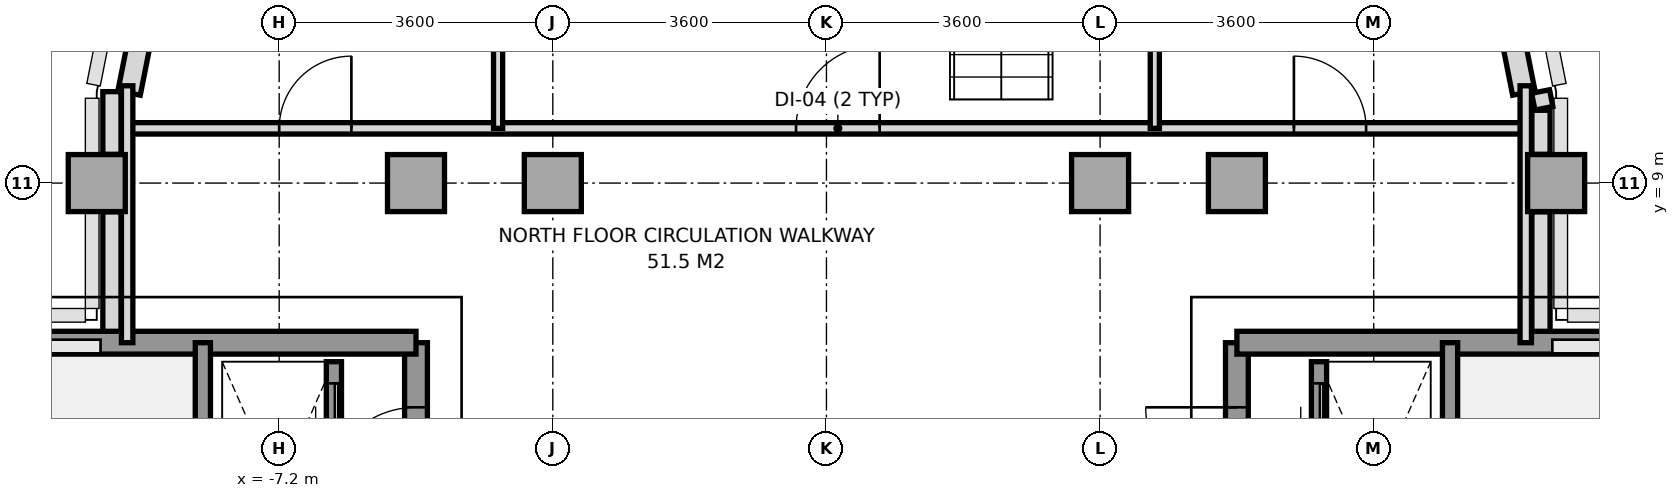
"""IFC4 building model, lengths in metres.
Left out: names, types, materials, properties, quantities, classifications, styles, units other than length and angle.
Written with IfcOpenShell. Run it as: python <this file> out.ifc"""

import sys

from ifc_helpers import new_model, si_unit, direction, frame, frame_2d, origin, origin_2d, place, context, subcontext, project, spatial, rectangle, extrude, source, transform, mapped, element, fill, save


model = new_model("IFC4")
c1 = context("Model", 3, precision=1e-05, world=origin(), true_north=direction((0.0, 1.0)))
c2 = subcontext(c1, "Body", "Model", "MODEL_VIEW")
j1 = project(units=[si_unit("LENGTHUNIT", "METRE"), si_unit("PLANEANGLEUNIT", "RADIAN")], contexts=[c1])
p1 = place(None, origin())
s1 = spatial("IfcSite", under=j1, at=p1, CompositionType="ELEMENT")
p2 = place(p1, origin())
s2 = spatial("IfcBuilding", under=s1, at=p2, CompositionType="ELEMENT")
p3 = place(p2, frame((0.0, 0.0, 230.0)))
s3 = spatial("IfcBuildingStorey", under=s2, at=p3, CompositionType="ELEMENT", Elevation=230.0)
m1 = source(origin(), c2, "Body", "SweptSolid", [
    extrude(rectangle(XDim=0.75, YDim=0.75, at=origin_2d()), origin(), (0.0, 0.0, 1.0), 3.01),
])
for number, where, z_axis, x_axis in (
    (1, (-9.6, 9.0, 0.0), (0.0, 0.0, 1.0), (1.0, 0.0, 0.0)),
    (2, (-5.4, 9.0, 0.0), (0.0, 0.0, 1.0), (1.0, 0.0, 0.0)),
    (3, (-3.6, 9.0, 0.0), (0.0, 0.0, 1.0), (1.0, 0.0, 0.0)),
    (4, (3.6, 9.0, 0.0), (0.0, 0.0, 1.0), (1.0, 0.0, 0.0)),
    (5, (5.4, 9.0, 0.0), (0.0, 0.0, 1.0), (1.0, 0.0, 0.0)),
    (6, (9.6, 9.0, 0.0), (0.0, 0.0, 1.0), (1.0, 0.0, 0.0)),
):
    element("IfcColumn", number, at=place(p3, frame(where, z_axis=z_axis, x_axis=x_axis)), inside=s3, PredefinedType="COLUMN", context=c2, shape_type="MappedRepresentation", body=[
        mapped(m1, transform((0.0, 0.0, 0.0), x_axis=(1.0, 0.0, 0.0), y_axis=(0.0, 1.0, 0.0), z_axis=(0.0, 0.0, 1.0), scale=1.0)),
    ])
for number, where, z_axis, x_axis in (
    (7, (9.175, 10.185, 0.0), (0.0, 0.0, 1.0), (-0.195, 0.981, 0.0)),
    (8, (-8.471, 13.725, 0.0), (0.0, 0.0, 1.0), (-0.195, -0.981, 0.0)),
):
    element("IfcWall", number, at=place(p3, frame(where, z_axis=z_axis, x_axis=x_axis)), inside=s3, PredefinedType="SOLIDWALL", context=c2, shape_type="SweptSolid", body=[
        extrude(rectangle(XDim=3.609, YDim=0.3, at=frame_2d((1.804, 0.0))), origin(), (0.0, 0.0, 1.0), 3.01),
    ])
p4 = place(p3, frame((-9.4, 6.953, 0.0), z_axis=(0.0, 0.0, 1.0), x_axis=(0.0, 1.0, 0.0)))
e9 = element("IfcWall", 9, at=p4, inside=s3, PredefinedType="PARAPET", context=c2, shape_type="SweptSolid", body=[
    extrude(rectangle(XDim=1.669, YDim=0.24, at=frame_2d((0.834, 0.0))), origin(), (0.0, 0.0, 1.0), 1.15),
])
p5 = place(p3, frame((-9.4, 9.378, 0.0), z_axis=(0.0, 0.0, 1.0), x_axis=(0.0, 1.0, 0.0)))
e10 = element("IfcWall", 10, at=p5, inside=s3, PredefinedType="PARAPET", context=c2, shape_type="SweptSolid", body=[
    extrude(rectangle(XDim=0.825, YDim=0.24, at=frame_2d((0.413, 0.0))), origin(), (0.0, 0.0, 1.0), 1.15),
])
p6 = place(p3, frame((9.395, 10.204, 0.0), z_axis=(0.0, 0.0, 1.0), x_axis=(0.194859894132, -0.980831087221, 0.0)))
e11 = element("IfcWall", 11, at=p6, inside=s3, PredefinedType="PARAPET", context=c2, shape_type="SweptSolid", body=[
    extrude(rectangle(XDim=0.224, YDim=0.24, at=frame_2d((0.112, 0.0))), origin(), (0.0, 0.0, 1.0), 1.15),
])
p7 = place(p3, frame((9.4, 9.958, 0.0), z_axis=(0.0, 0.0, 1.0), x_axis=(0.0, -1.0, 0.0)))
e12 = element("IfcWall", 12, at=p7, inside=s3, PredefinedType="PARAPET", context=c2, shape_type="SweptSolid", body=[
    extrude(rectangle(XDim=0.58, YDim=0.24, at=frame_2d((0.29, 0.0))), origin(), (0.0, 0.0, 1.0), 1.15),
])
p8 = place(p3, frame((9.4, 8.622, 0.0), z_axis=(0.0, 0.0, 1.0), x_axis=(0.0, -1.0, 0.0)))
e13 = element("IfcWall", 13, at=p8, inside=s3, PredefinedType="PARAPET", context=c2, shape_type="SweptSolid", body=[
    extrude(rectangle(XDim=1.669, YDim=0.24, at=frame_2d((0.834, 0.0))), origin(), (0.0, 0.0, 1.0), 1.15),
])
p9 = place(p3, frame((-5.4, -5.6, 0.0), z_axis=(0.0, 0.0, 1.0), x_axis=(0.0, 1.0, 0.0)))
e14 = element("IfcWall", 14, at=p9, inside=s3, PredefinedType="SHEAR", context=c2, shape_type="SweptSolid", body=[
    extrude(rectangle(XDim=12.5, YDim=0.3, at=frame_2d((6.25, 0.0))), origin(), (0.0, 0.0, 1.0), 3.01),
])
p10 = place(p9, frame((4.55, 0.0, 0.0)))
e15 = element("IfcOpeningElement", 15, at=p10, cuts=e14, PredefinedType="OPENING", context=c2, shape_type="SweptSolid", body=[
    extrude(rectangle(XDim=1.2, YDim=2.2, at=frame_2d((0.6, 1.1))), frame((0.0, 0.16, 0.0), z_axis=(0.0, -1.0, 0.0), x_axis=(1.0, 0.0, 0.0)), (0.0, 0.0, 1.0), 0.32),
])
p11 = place(p9, frame((10.45, 0.0, 0.0)))
e16 = element("IfcOpeningElement", 16, at=p11, cuts=e14, PredefinedType="OPENING", context=c2, shape_type="SweptSolid", body=[
    extrude(rectangle(XDim=1.2, YDim=2.2, at=frame_2d((0.6, 1.1))), frame((0.0, 0.16, 0.0), z_axis=(0.0, -1.0, 0.0), x_axis=(1.0, 0.0, 0.0)), (0.0, 0.0, 1.0), 0.32),
])
p12 = place(p9, frame((6.86, 0.0, 0.0)))
e17 = element("IfcOpeningElement", 17, at=p12, cuts=e14, PredefinedType="OPENING", context=c2, shape_type="SweptSolid", body=[
    extrude(rectangle(XDim=0.8, YDim=2.1, at=frame_2d((0.4, 1.05))), frame((0.0, 0.16, 0.0), z_axis=(0.0, -1.0, 0.0), x_axis=(1.0, 0.0, 0.0)), (0.0, 0.0, 1.0), 0.32),
])
p13 = place(p3, frame((-11.356, 6.9, 0.0), z_axis=(0.0, 0.0, 1.0), x_axis=(1.0, 0.0, 0.0)))
e18 = element("IfcWall", 18, at=p13, inside=s3, PredefinedType="SHEAR", context=c2, shape_type="SweptSolid", body=[
    extrude(rectangle(XDim=5.956, YDim=0.3, at=frame_2d((2.978, 0.0))), origin(), (0.0, 0.0, 1.0), 3.01),
])
p14 = place(p3, frame((-8.204, -0.016, 0.0), z_axis=(0.0, 0.0, 1.0), x_axis=(0.0, 1.0, 0.0)))
e19 = element("IfcWall", 19, at=p14, inside=s3, PredefinedType="SOLIDWALL", context=c2, shape_type="SweptSolid", body=[
    extrude(rectangle(XDim=6.916, YDim=0.2, at=frame_2d((3.458, 0.0))), origin(), (0.0, 0.0, 1.0), 3.01),
])
p15 = place(p14, frame((0.2, 0.0, 0.0)))
e20 = element("IfcOpeningElement", 20, at=p15, cuts=e19, PredefinedType="OPENING", context=c2, shape_type="SweptSolid", body=[
    extrude(rectangle(XDim=1.2, YDim=2.2, at=frame_2d((0.6, 1.1))), frame((0.0, 0.11, 0.0), z_axis=(0.0, -1.0, 0.0), x_axis=(1.0, 0.0, 0.0)), (0.0, 0.0, 1.0), 0.22),
])
p16 = place(p3, frame((5.4, -5.6, 0.0), z_axis=(0.0, 0.0, 1.0), x_axis=(0.0, 1.0, 0.0)))
e21 = element("IfcWall", 21, at=p16, inside=s3, PredefinedType="SHEAR", context=c2, shape_type="SweptSolid", body=[
    extrude(rectangle(XDim=12.5, YDim=0.3, at=frame_2d((6.25, 0.0))), origin(), (0.0, 0.0, 1.0), 3.01),
])
p17 = place(p16, frame((4.55, 0.0, 0.0)))
e22 = element("IfcOpeningElement", 22, at=p17, cuts=e21, PredefinedType="OPENING", context=c2, shape_type="SweptSolid", body=[
    extrude(rectangle(XDim=1.2, YDim=2.2, at=frame_2d((0.6, 1.1))), frame((0.0, 0.16, 0.0), z_axis=(0.0, -1.0, 0.0), x_axis=(1.0, 0.0, 0.0)), (0.0, 0.0, 1.0), 0.32),
])
p18 = place(p16, frame((10.45, 0.0, 0.0)))
e23 = element("IfcOpeningElement", 23, at=p18, cuts=e21, PredefinedType="OPENING", context=c2, shape_type="SweptSolid", body=[
    extrude(rectangle(XDim=1.2, YDim=2.2, at=frame_2d((0.6, 1.1))), frame((0.0, 0.16, 0.0), z_axis=(0.0, -1.0, 0.0), x_axis=(1.0, 0.0, 0.0)), (0.0, 0.0, 1.0), 0.32),
])
p19 = place(p16, frame((6.86, 0.0, 0.0)))
e24 = element("IfcOpeningElement", 24, at=p19, cuts=e21, PredefinedType="OPENING", context=c2, shape_type="SweptSolid", body=[
    extrude(rectangle(XDim=0.8, YDim=2.1, at=frame_2d((0.4, 1.05))), frame((0.0, 0.16, 0.0), z_axis=(0.0, -1.0, 0.0), x_axis=(1.0, 0.0, 0.0)), (0.0, 0.0, 1.0), 0.32),
])
p20 = place(p16, frame((7.88, 0.0, 0.0)))
e25 = element("IfcOpeningElement", 25, at=p20, cuts=e21, PredefinedType="OPENING", context=c2, shape_type="SweptSolid", body=[
    extrude(rectangle(XDim=0.8, YDim=2.1, at=frame_2d((0.4, 1.05))), frame((0.0, 0.16, 0.0), z_axis=(0.0, -1.0, 0.0), x_axis=(1.0, 0.0, 0.0)), (0.0, 0.0, 1.0), 0.32),
])
p21 = place(p3, frame((5.4, 6.9, 0.0), z_axis=(0.0, 0.0, 1.0), x_axis=(1.0, 0.0, 0.0)))
e26 = element("IfcWall", 26, at=p21, inside=s3, PredefinedType="SHEAR", context=c2, shape_type="SweptSolid", body=[
    extrude(rectangle(XDim=5.956, YDim=0.3, at=frame_2d((2.978, 0.0))), origin(), (0.0, 0.0, 1.0), 3.01),
])
p22 = place(p3, frame((8.204, -0.016, 0.0), z_axis=(0.0, 0.0, 1.0), x_axis=(0.0, 1.0, 0.0)))
e27 = element("IfcWall", 27, at=p22, inside=s3, PredefinedType="SOLIDWALL", context=c2, shape_type="SweptSolid", body=[
    extrude(rectangle(XDim=6.916, YDim=0.2, at=frame_2d((3.458, 0.0))), origin(), (0.0, 0.0, 1.0), 3.01),
])
p23 = place(p22, frame((0.2, 0.0, 0.0)))
e28 = element("IfcOpeningElement", 28, at=p23, cuts=e27, PredefinedType="OPENING", context=c2, shape_type="SweptSolid", body=[
    extrude(rectangle(XDim=1.2, YDim=2.2, at=frame_2d((0.6, 1.1))), frame((0.0, 0.11, 0.0), z_axis=(0.0, -1.0, 0.0), x_axis=(1.0, 0.0, 0.0)), (0.0, 0.0, 1.0), 0.22),
])
p24 = place(p3, frame((-6.48, 4.98, 0.0), z_axis=(0.0, 0.0, 1.0), x_axis=(0.0, 1.0, 0.0)))
e29 = element("IfcWall", 29, at=p24, inside=s3, PredefinedType="SOLIDWALL", context=c2, shape_type="SweptSolid", body=[
    extrude(rectangle(XDim=1.67, YDim=0.2, at=frame_2d((0.835, 0.0))), origin(), (0.0, 0.0, 1.0), 3.01),
])
p25 = place(p24, frame((0.285, 0.0, 0.0)))
e30 = element("IfcOpeningElement", 30, at=p25, cuts=e29, PredefinedType="OPENING", context=c2, shape_type="SweptSolid", body=[
    extrude(rectangle(XDim=1.1, YDim=2.2, at=frame_2d((0.55, 1.1))), frame((0.0, 0.11, 0.0), z_axis=(0.0, -1.0, 0.0), x_axis=(1.0, 0.0, 0.0)), (0.0, 0.0, 1.0), 0.22),
])
p26 = place(p3, frame((6.48, 4.98, 0.0), z_axis=(0.0, 0.0, 1.0), x_axis=(0.0, 1.0, 0.0)))
e31 = element("IfcWall", 31, at=p26, inside=s3, PredefinedType="SOLIDWALL", context=c2, shape_type="SweptSolid", body=[
    extrude(rectangle(XDim=1.67, YDim=0.2, at=frame_2d((0.835, 0.0))), origin(), (0.0, 0.0, 1.0), 3.01),
])
p27 = place(p26, frame((0.285, 0.0, 0.0)))
e32 = element("IfcOpeningElement", 32, at=p27, cuts=e31, PredefinedType="OPENING", context=c2, shape_type="SweptSolid", body=[
    extrude(rectangle(XDim=1.1, YDim=2.2, at=frame_2d((0.55, 1.1))), frame((0.0, 0.11, 0.0), z_axis=(0.0, -1.0, 0.0), x_axis=(1.0, 0.0, 0.0)), (0.0, 0.0, 1.0), 0.22),
])
p28 = place(p3, frame((-9.2, 9.72, 0.0), z_axis=(0.0, 0.0, 1.0), x_axis=(1.0, 0.0, 0.0)))
e33 = element("IfcWall", 33, at=p28, inside=s3, PredefinedType="PARTITIONING", context=c2, shape_type="SweptSolid", body=[
    extrude(rectangle(XDim=18.4, YDim=0.15, at=frame_2d((9.2, 0.0))), origin(), (0.0, 0.0, 1.0), 3.01),
])
p29 = place(p28, frame((2.0, 0.0, 0.0)))
e34 = element("IfcOpeningElement", 34, at=p29, cuts=e33, PredefinedType="OPENING", context=c2, shape_type="SweptSolid", body=[
    extrude(rectangle(XDim=0.95, YDim=2.15, at=frame_2d((0.475, 1.075))), frame((0.0, 0.085, 0.0), z_axis=(0.0, -1.0, 0.0), x_axis=(1.0, 0.0, 0.0)), (0.0, 0.0, 1.0), 0.17),
])
p30 = place(p28, frame((15.35, 0.0, 0.0)))
e35 = element("IfcOpeningElement", 35, at=p30, cuts=e33, PredefinedType="OPENING", context=c2, shape_type="SweptSolid", body=[
    extrude(rectangle(XDim=0.95, YDim=2.15, at=frame_2d((0.475, 1.075))), frame((0.0, 0.085, 0.0), z_axis=(0.0, -1.0, 0.0), x_axis=(1.0, 0.0, 0.0)), (0.0, 0.0, 1.0), 0.17),
])
p31 = place(p28, frame((8.8, 0.0, 0.0)))
e36 = element("IfcOpeningElement", 36, at=p31, cuts=e33, PredefinedType="OPENING", context=c2, shape_type="SweptSolid", body=[
    extrude(rectangle(XDim=1.1, YDim=2.2, at=frame_2d((0.55, 1.1))), frame((0.0, 0.085, 0.0), z_axis=(0.0, -1.0, 0.0), x_axis=(1.0, 0.0, 0.0)), (0.0, 0.0, 1.0), 0.17),
])
for number, where, z_axis, x_axis in (
    (37, (-9.2, 6.9, 0.0), (0.0, 0.0, 1.0), (0.0, 1.0, 0.0)),
    (38, (9.2, 6.9, 0.0), (0.0, 0.0, 1.0), (0.0, 1.0, 0.0)),
):
    element("IfcWall", number, at=place(p3, frame(where, z_axis=z_axis, x_axis=x_axis)), inside=s3, PredefinedType="PARTITIONING", context=c2, shape_type="SweptSolid", body=[
        extrude(rectangle(XDim=3.38, YDim=0.15, at=frame_2d((1.69, 0.0))), origin(), (0.0, 0.0, 1.0), 2.61),
    ])
for number, where, z_axis, x_axis in (
    (39, (-4.32, 9.72, 0.0), (0.0, 0.0, 1.0), (0.0, 1.0, 0.0)),
    (40, (4.32, 9.72, 0.0), (0.0, 0.0, 1.0), (0.0, 1.0, 0.0)),
):
    element("IfcWall", number, at=place(p3, frame(where, z_axis=z_axis, x_axis=x_axis)), inside=s3, PredefinedType="PARTITIONING", context=c2, shape_type="SweptSolid", body=[
        extrude(rectangle(XDim=4.42, YDim=0.12, at=frame_2d((2.21, 0.0))), origin(), (0.0, 0.0, 1.0), 3.01),
    ])
m2 = source(origin(), c2, "Body", "SweptSolid", [
    extrude(rectangle(XDim=1.2, YDim=2.2, at=frame_2d((0.6, 1.1))), frame((0.0, 0.025, 0.0), z_axis=(0.0, -1.0, 0.0), x_axis=(1.0, 0.0, 0.0)), (0.0, 0.0, 1.0), 0.05),
])
p32 = place(p11, origin())
e41 = element("IfcDoor", 41, at=p32, inside=s3, OperationType="SINGLE_SWING_LEFT", PredefinedType="DOOR", context=c2, shape_type="MappedRepresentation", body=[
    mapped(m2, transform((0.0, 0.0, 0.0), x_axis=(1.0, 0.0, 0.0), y_axis=(0.0, 1.0, 0.0), z_axis=(0.0, 0.0, 1.0), scale=1.0)),
])
fill(e16, e41)
p33 = place(p18, origin())
e42 = element("IfcDoor", 42, at=p33, inside=s3, OperationType="SINGLE_SWING_RIGHT", PredefinedType="DOOR", context=c2, shape_type="MappedRepresentation", body=[
    mapped(m2, transform((0.0, 0.0, 0.0), x_axis=(1.0, 0.0, 0.0), y_axis=(0.0, 1.0, 0.0), z_axis=(0.0, 0.0, 1.0), scale=1.0)),
])
fill(e23, e42)
m3 = source(origin(), c2, "Body", "SweptSolid", [
    extrude(rectangle(XDim=1.1, YDim=2.2, at=frame_2d((0.55, 1.1))), frame((0.0, 0.025, 0.0), z_axis=(0.0, -1.0, 0.0), x_axis=(1.0, 0.0, 0.0)), (0.0, 0.0, 1.0), 0.05),
])
p34 = place(p25, origin())
e43 = element("IfcDoor", 43, at=p34, inside=s3, OperationType="SLIDING_TO_LEFT", PredefinedType="DOOR", context=c2, shape_type="MappedRepresentation", body=[
    mapped(m3, transform((0.0, 0.0, 0.0), x_axis=(1.0, 0.0, 0.0), y_axis=(0.0, 1.0, 0.0), z_axis=(0.0, 0.0, 1.0), scale=1.0)),
])
fill(e30, e43)
p35 = place(p27, origin())
e44 = element("IfcDoor", 44, at=p35, inside=s3, OperationType="SLIDING_TO_LEFT", PredefinedType="DOOR", context=c2, shape_type="MappedRepresentation", body=[
    mapped(m3, transform((0.0, 0.0, 0.0), x_axis=(1.0, 0.0, 0.0), y_axis=(0.0, 1.0, 0.0), z_axis=(0.0, 0.0, 1.0), scale=1.0)),
])
fill(e32, e44)
m4 = source(origin(), c2, "Body", "SweptSolid", [
    extrude(rectangle(XDim=0.95, YDim=2.15, at=frame_2d((0.475, 1.075))), frame((0.0, 0.025, 0.0), z_axis=(0.0, -1.0, 0.0), x_axis=(1.0, 0.0, 0.0)), (0.0, 0.0, 1.0), 0.05),
])
p36 = place(p29, origin())
e45 = element("IfcDoor", 45, at=p36, inside=s3, OperationType="SINGLE_SWING_RIGHT", PredefinedType="DOOR", context=c2, shape_type="MappedRepresentation", body=[
    mapped(m4, transform((0.0, 0.0, 0.0), x_axis=(1.0, 0.0, 0.0), y_axis=(0.0, 1.0, 0.0), z_axis=(0.0, 0.0, 1.0), scale=1.0)),
])
fill(e34, e45)
p37 = place(p30, origin())
e46 = element("IfcDoor", 46, at=p37, inside=s3, OperationType="SINGLE_SWING_LEFT", PredefinedType="DOOR", context=c2, shape_type="MappedRepresentation", body=[
    mapped(m4, transform((0.0, 0.0, 0.0), x_axis=(1.0, 0.0, 0.0), y_axis=(0.0, 1.0, 0.0), z_axis=(0.0, 0.0, 1.0), scale=1.0)),
])
fill(e35, e46)
p38 = place(p31, origin())
e47 = element("IfcDoor", 47, at=p38, inside=s3, OperationType="SINGLE_SWING_RIGHT", PredefinedType="DOOR", context=c2, shape_type="MappedRepresentation", body=[
    mapped(m3, transform((0.0, 0.0, 0.0), x_axis=(1.0, 0.0, 0.0), y_axis=(0.0, 1.0, 0.0), z_axis=(0.0, 0.0, 1.0), scale=1.0)),
])
fill(e36, e47)
save(model, sys.argv[1])
